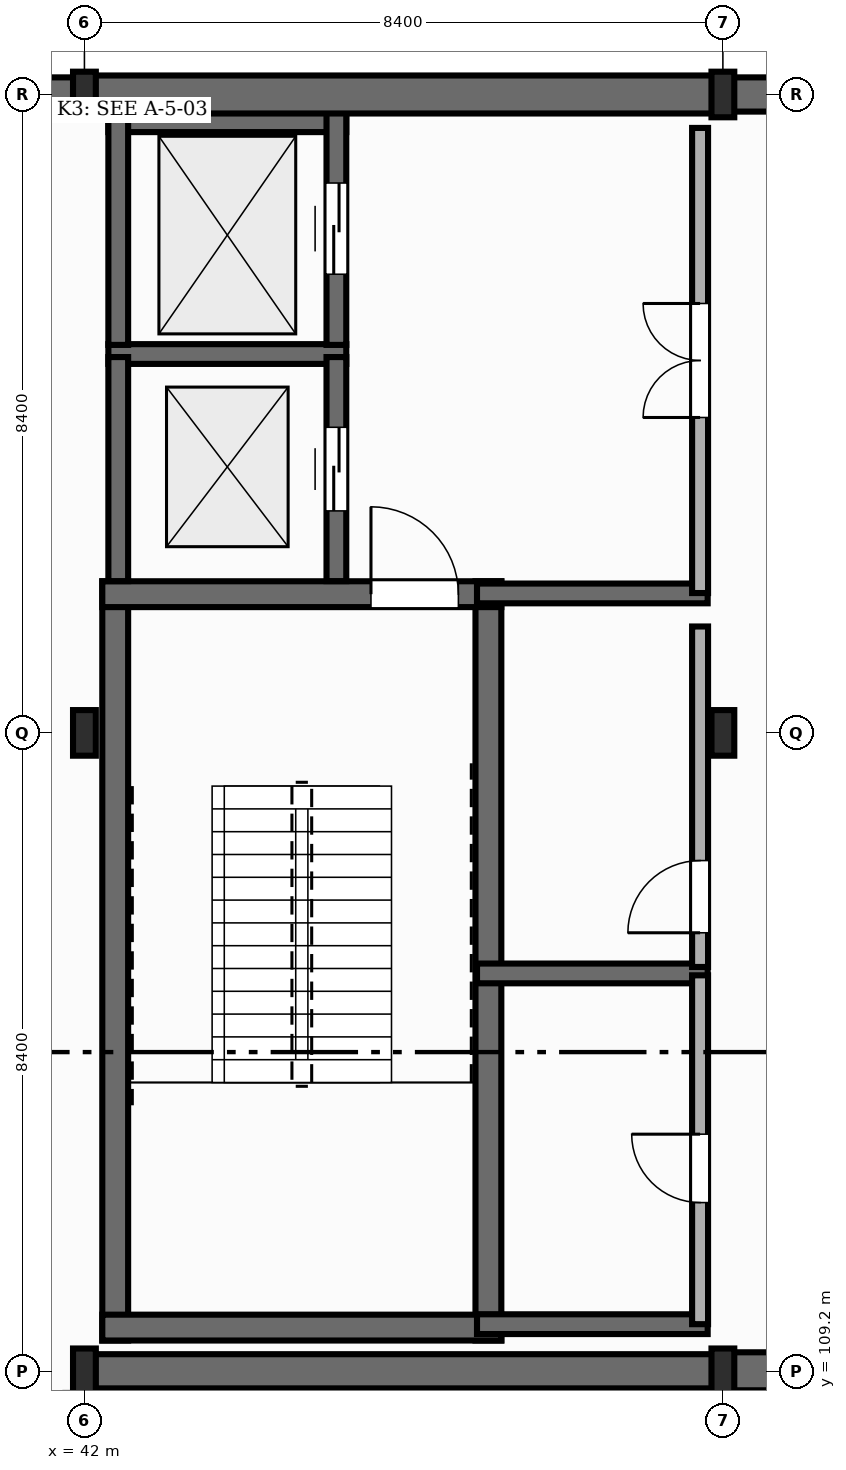
"""IFC4 building model, lengths in metres.
Left out: names, types, materials, properties, quantities, classifications, styles, units other than length and angle.
Written with IfcOpenShell. Run it as: python <this file> out.ifc"""

import sys

from ifc_helpers import new_model, si_unit, direction, frame, frame_2d, origin, origin_2d, place, context, subcontext, project, spatial, rectangle, i_section, extrude, element, fill, save


model = new_model("IFC4")
c1 = context("Model", 3, precision=1e-05, world=origin(), true_north=direction((0.0, 1.0)))
c2 = subcontext(c1, "Body", "Model", "MODEL_VIEW")
j1 = project(units=[si_unit("LENGTHUNIT", "METRE"), si_unit("PLANEANGLEUNIT", "RADIAN")], contexts=[c1])
p1 = place(None, origin())
s1 = spatial("IfcSite", under=j1, at=p1, CompositionType="ELEMENT")
p2 = place(p1, origin())
s2 = spatial("IfcBuilding", under=s1, at=p2, CompositionType="ELEMENT")
p3 = place(p2, frame((0.0, 0.0, -4.5)))
s3 = spatial("IfcBuildingStorey", under=s2, at=p3, CompositionType="ELEMENT", Elevation=-4.5)
for number, where, z_axis, x_axis in (
    (1, (42.0, 109.2, 0.0), (0.0, 0.0, 1.0), (1.0, 0.0, 0.0)),
    (2, (42.0, 117.6, 0.0), (0.0, 0.0, 1.0), (1.0, 0.0, 0.0)),
    (3, (42.0, 126.0, 0.0), (0.0, 0.0, 1.0), (1.0, 0.0, 0.0)),
    (4, (50.4, 109.2, 0.0), (0.0, 0.0, 1.0), (1.0, 0.0, 0.0)),
    (5, (50.4, 117.6, 0.0), (0.0, 0.0, 1.0), (1.0, 0.0, 0.0)),
    (6, (50.4, 126.0, 0.0), (0.0, 0.0, 1.0), (1.0, 0.0, 0.0)),
):
    element("IfcColumn", number, at=place(p3, frame(where, z_axis=z_axis, x_axis=x_axis)), inside=s3, PredefinedType="COLUMN", context=c2, shape_type="SweptSolid", body=[
        extrude(i_section(OverallWidth=0.3, OverallDepth=0.6, WebThickness=0.015, FlangeThickness=0.03, FilletRadius=0.027, at=origin_2d()), origin(), (0.0, 0.0, 1.0), 4.5),
    ])
for number, where, z_axis, x_axis in (
    (7, (58.792, 126.0, 0.0), (0.0, 0.0, 1.0), (-1.0, 0.0, 0.0)),
    (8, (41.992, 126.0, 0.0), (0.0, 0.0, 1.0), (-1.0, 0.0, 0.0)),
    (9, (42.008, 109.2, 0.0), (0.0, 0.0, 1.0), (1.0, 0.0, 0.0)),
):
    element("IfcWall", number, at=place(p3, frame(where, z_axis=z_axis, x_axis=x_axis)), inside=s3, PredefinedType="USERDEFINED", context=c2, shape_type="SweptSolid", body=[
        extrude(rectangle(XDim=8.384, YDim=0.45, at=frame_2d((4.192, 0.0))), origin(), (0.0, 0.0, 1.0), 4.25),
    ])
p4 = place(p3, frame((50.408, 109.2, 0.0), z_axis=(0.0, 0.0, 1.0), x_axis=(1.0, 0.0, 0.0)))
e10 = element("IfcWall", 10, at=p4, inside=s3, PredefinedType="USERDEFINED", context=c2, shape_type="SweptSolid", body=[
    extrude(rectangle(XDim=8.384, YDim=0.5, at=frame_2d((4.192, 0.0))), origin(), (0.0, 0.0, 1.0), 4.25),
])
for number, where, z_axis, x_axis in (
    (11, (42.405, 109.605, 0.0), (0.0, 0.0, 1.0), (0.0, 1.0, 0.0)),
    (12, (47.315, 109.605, 0.0), (0.0, 0.0, 1.0), (0.0, 1.0, 0.0)),
):
    element("IfcWall", number, at=place(p3, frame(where, z_axis=z_axis, x_axis=x_axis)), inside=s3, PredefinedType="SHEAR", context=c2, shape_type="SweptSolid", body=[
        extrude(rectangle(XDim=9.99, YDim=0.34, at=frame_2d((4.995, 0.0))), origin(), (0.0, 0.0, 1.0), 4.25),
    ])
p5 = place(p3, frame((42.235, 109.775, 0.0), z_axis=(0.0, 0.0, 1.0), x_axis=(1.0, 0.0, 0.0)))
e13 = element("IfcWall", 13, at=p5, inside=s3, PredefinedType="SHEAR", context=c2, shape_type="SweptSolid", body=[
    extrude(rectangle(XDim=5.25, YDim=0.34, at=frame_2d((2.625, 0.0))), origin(), (0.0, 0.0, 1.0), 4.25),
])
p6 = place(p3, frame((42.235, 119.425, 0.0), z_axis=(0.0, 0.0, 1.0), x_axis=(1.0, 0.0, 0.0)))
e14 = element("IfcWall", 14, at=p6, inside=s3, PredefinedType="SHEAR", context=c2, shape_type="SweptSolid", body=[
    extrude(rectangle(XDim=5.25, YDim=0.34, at=frame_2d((2.625, 0.0))), origin(), (0.0, 0.0, 1.0), 4.25),
])
p7 = place(p6, frame((3.535, 0.0, 0.0)))
e15 = element("IfcOpeningElement", 15, at=p7, cuts=e14, PredefinedType="OPENING", context=c2, shape_type="SweptSolid", body=[
    extrude(rectangle(XDim=1.15, YDim=2.15, at=frame_2d((0.575, 1.075))), frame((0.0, 0.18, 0.0), z_axis=(0.0, -1.0, 0.0), x_axis=(1.0, 0.0, 0.0)), (0.0, 0.0, 1.0), 0.36),
])
p8 = place(p3, frame((42.315, 122.585, 0.0), z_axis=(0.0, 0.0, 1.0), x_axis=(1.0, 0.0, 0.0)))
e16 = element("IfcWall", 16, at=p8, inside=s3, PredefinedType="SHEAR", context=c2, shape_type="SweptSolid", body=[
    extrude(rectangle(XDim=3.13, YDim=0.26, at=frame_2d((1.565, 0.0))), origin(), (0.0, 0.0, 1.0), 4.25),
])
p9 = place(p3, frame((42.445, 119.597, 0.0), z_axis=(0.0, 0.0, 1.0), x_axis=(0.0, 1.0, 0.0)))
e17 = element("IfcWall", 17, at=p9, inside=s3, PredefinedType="SHEAR", context=c2, shape_type="SweptSolid", body=[
    extrude(rectangle(XDim=2.948, YDim=0.26, at=frame_2d((1.474, 0.0))), origin(), (0.0, 0.0, 1.0), 4.25),
])
p10 = place(p3, frame((45.315, 119.597, 0.0), z_axis=(0.0, 0.0, 1.0), x_axis=(0.0, 1.0, 0.0)))
e18 = element("IfcWall", 18, at=p10, inside=s3, PredefinedType="SHEAR", context=c2, shape_type="SweptSolid", body=[
    extrude(rectangle(XDim=2.948, YDim=0.26, at=frame_2d((1.474, 0.0))), origin(), (0.0, 0.0, 1.0), 4.25),
])
p11 = place(p10, frame((0.924, 0.0, 0.0)))
e19 = element("IfcOpeningElement", 19, at=p11, cuts=e18, PredefinedType="OPENING", context=c2, shape_type="SweptSolid", body=[
    extrude(rectangle(XDim=1.1, YDim=2.15, at=frame_2d((0.55, 1.075))), frame((0.0, 0.14, 0.0), z_axis=(0.0, -1.0, 0.0), x_axis=(1.0, 0.0, 0.0)), (0.0, 0.0, 1.0), 0.28),
])
p12 = place(p3, frame((42.315, 125.635, 0.0), z_axis=(0.0, 0.0, 1.0), x_axis=(1.0, 0.0, 0.0)))
e20 = element("IfcWall", 20, at=p12, inside=s3, PredefinedType="SHEAR", context=c2, shape_type="SweptSolid", body=[
    extrude(rectangle(XDim=3.13, YDim=0.26, at=frame_2d((1.565, 0.0))), origin(), (0.0, 0.0, 1.0), 4.25),
])
p13 = place(p3, frame((42.445, 122.705, 0.0), z_axis=(0.0, 0.0, 1.0), x_axis=(0.0, 1.0, 0.0)))
e21 = element("IfcWall", 21, at=p13, inside=s3, PredefinedType="SHEAR", context=c2, shape_type="SweptSolid", body=[
    extrude(rectangle(XDim=3.06, YDim=0.26, at=frame_2d((1.53, 0.0))), origin(), (0.0, 0.0, 1.0), 4.25),
])
p14 = place(p3, frame((45.315, 122.705, 0.0), z_axis=(0.0, 0.0, 1.0), x_axis=(0.0, 1.0, 0.0)))
e22 = element("IfcWall", 22, at=p14, inside=s3, PredefinedType="SHEAR", context=c2, shape_type="SweptSolid", body=[
    extrude(rectangle(XDim=3.06, YDim=0.26, at=frame_2d((1.53, 0.0))), origin(), (0.0, 0.0, 1.0), 4.25),
])
p15 = place(p14, frame((0.93, 0.0, 0.0)))
e23 = element("IfcOpeningElement", 23, at=p15, cuts=e22, PredefinedType="OPENING", context=c2, shape_type="SweptSolid", body=[
    extrude(rectangle(XDim=1.2, YDim=2.15, at=frame_2d((0.6, 1.075))), frame((0.0, 0.14, 0.0), z_axis=(0.0, -1.0, 0.0), x_axis=(1.0, 0.0, 0.0)), (0.0, 0.0, 1.0), 0.28),
])
for number, where, z_axis, x_axis in (
    (24, (47.165, 109.82, 0.0), (0.0, 0.0, 1.0), (1.0, 0.0, 0.0)),
    (25, (47.165, 114.435, 0.0), (0.0, 0.0, 1.0), (1.0, 0.0, 0.0)),
    (26, (47.165, 119.435, 0.0), (0.0, 0.0, 1.0), (1.0, 0.0, 0.0)),
):
    element("IfcWall", number, at=place(p3, frame(where, z_axis=z_axis, x_axis=x_axis)), inside=s3, PredefinedType="SHEAR", context=c2, shape_type="SweptSolid", body=[
        extrude(rectangle(XDim=3.035, YDim=0.26, at=frame_2d((1.518, 0.0))), origin(), (0.0, 0.0, 1.0), 4.25),
    ])
p16 = place(p3, frame((50.1, 109.82, 0.0), z_axis=(0.0, 0.0, 1.0), x_axis=(0.0, 1.0, 0.0)))
e27 = element("IfcWall", 27, at=p16, inside=s3, PredefinedType="STANDARD", context=c2, shape_type="SweptSolid", body=[
    extrude(rectangle(XDim=4.59, YDim=0.21, at=frame_2d((2.295, 0.0))), origin(), (0.0, 0.0, 1.0), 3.632),
])
p17 = place(p16, frame((1.6, 0.0, 0.0)))
e28 = element("IfcOpeningElement", 28, at=p17, cuts=e27, PredefinedType="OPENING", context=c2, shape_type="SweptSolid", body=[
    extrude(rectangle(XDim=0.9, YDim=2.1, at=frame_2d((0.45, 1.05))), frame((0.0, 0.115, 0.0), z_axis=(0.0, -1.0, 0.0), x_axis=(1.0, 0.0, 0.0)), (0.0, 0.0, 1.0), 0.23),
])
p18 = place(p3, frame((50.1, 114.52, 0.0), z_axis=(0.0, 0.0, 1.0), x_axis=(0.0, 1.0, 0.0)))
e29 = element("IfcWall", 29, at=p18, inside=s3, PredefinedType="STANDARD", context=c2, shape_type="SweptSolid", body=[
    extrude(rectangle(XDim=4.48, YDim=0.21, at=frame_2d((2.24, 0.0))), origin(), (0.0, 0.0, 1.0), 3.632),
])
p19 = place(p18, frame((0.45, 0.0, 0.0)))
e30 = element("IfcOpeningElement", 30, at=p19, cuts=e29, PredefinedType="OPENING", context=c2, shape_type="SweptSolid", body=[
    extrude(rectangle(XDim=0.95, YDim=2.15, at=frame_2d((0.475, 1.075))), frame((0.0, 0.115, 0.0), z_axis=(0.0, -1.0, 0.0), x_axis=(1.0, 0.0, 0.0)), (0.0, 0.0, 1.0), 0.23),
])
p20 = place(p3, frame((50.1, 119.44, 0.0), z_axis=(0.0, 0.0, 1.0), x_axis=(0.0, 1.0, 0.0)))
e31 = element("IfcWall", 31, at=p20, inside=s3, PredefinedType="STANDARD", context=c2, shape_type="SweptSolid", body=[
    extrude(rectangle(XDim=6.12, YDim=0.21, at=frame_2d((3.06, 0.0))), origin(), (0.0, 0.0, 1.0), 3.742),
])
p21 = place(p20, frame((2.31, 0.0, 0.0)))
e32 = element("IfcOpeningElement", 32, at=p21, cuts=e31, PredefinedType="OPENING", context=c2, shape_type="SweptSolid", body=[
    extrude(rectangle(XDim=1.5, YDim=2.2, at=frame_2d((0.75, 1.1))), frame((0.0, 0.115, 0.0), z_axis=(0.0, -1.0, 0.0), x_axis=(1.0, 0.0, 0.0)), (0.0, 0.0, 1.0), 0.23),
])
p22 = place(p3, frame((50.392, 126.0, 0.0), z_axis=(0.0, 0.0, 1.0), x_axis=(-1.0, 0.0, 0.0)))
e33 = element("IfcWall", 33, at=p22, inside=s3, PredefinedType="USERDEFINED", context=c2, shape_type="SweptSolid", body=[
    extrude(rectangle(XDim=8.384, YDim=0.5, at=frame_2d((4.192, 0.0))), origin(), (0.0, 0.0, 1.0), 4.25),
])
p23 = place(p7, origin())
e34 = element("IfcDoor", 34, at=p23, inside=s3, OperationType="SINGLE_SWING_LEFT", PredefinedType="DOOR", context=c2, shape_type="SweptSolid", body=[
    extrude(rectangle(XDim=1.15, YDim=2.15, at=frame_2d((0.575, 1.075))), frame((0.0, 0.025, 0.0), z_axis=(0.0, -1.0, 0.0), x_axis=(1.0, 0.0, 0.0)), (0.0, 0.0, 1.0), 0.05),
])
fill(e15, e34)
p24 = place(p11, origin())
e35 = element("IfcDoor", 35, at=p24, inside=s3, OperationType="DOUBLE_DOOR_SLIDING", PredefinedType="DOOR", context=c2, shape_type="SweptSolid", body=[
    extrude(rectangle(XDim=1.1, YDim=2.15, at=frame_2d((0.55, 1.075))), frame((0.0, 0.025, 0.0), z_axis=(0.0, -1.0, 0.0), x_axis=(1.0, 0.0, 0.0)), (0.0, 0.0, 1.0), 0.05),
])
fill(e19, e35)
p25 = place(p15, origin())
e36 = element("IfcDoor", 36, at=p25, inside=s3, OperationType="DOUBLE_DOOR_SLIDING", PredefinedType="DOOR", context=c2, shape_type="SweptSolid", body=[
    extrude(rectangle(XDim=1.2, YDim=2.15, at=frame_2d((0.6, 1.075))), frame((0.0, 0.025, 0.0), z_axis=(0.0, -1.0, 0.0), x_axis=(1.0, 0.0, 0.0)), (0.0, 0.0, 1.0), 0.05),
])
fill(e23, e36)
p26 = place(p17, origin())
e37 = element("IfcDoor", 37, at=p26, inside=s3, OperationType="SINGLE_SWING_RIGHT", PredefinedType="DOOR", context=c2, shape_type="SweptSolid", body=[
    extrude(rectangle(XDim=0.9, YDim=2.1, at=frame_2d((0.45, 1.05))), frame((0.0, 0.025, 0.0), z_axis=(0.0, -1.0, 0.0), x_axis=(1.0, 0.0, 0.0)), (0.0, 0.0, 1.0), 0.05),
])
fill(e28, e37)
p27 = place(p19, origin())
e38 = element("IfcDoor", 38, at=p27, inside=s3, OperationType="SINGLE_SWING_LEFT", PredefinedType="DOOR", context=c2, shape_type="SweptSolid", body=[
    extrude(rectangle(XDim=0.95, YDim=2.15, at=frame_2d((0.475, 1.075))), frame((0.0, 0.025, 0.0), z_axis=(0.0, -1.0, 0.0), x_axis=(1.0, 0.0, 0.0)), (0.0, 0.0, 1.0), 0.05),
])
fill(e30, e38)
p28 = place(p21, origin())
e39 = element("IfcDoor", 39, at=p28, inside=s3, OperationType="DOUBLE_DOOR_SINGLE_SWING", PredefinedType="DOOR", context=c2, shape_type="SweptSolid", body=[
    extrude(rectangle(XDim=1.5, YDim=2.2, at=frame_2d((0.75, 1.1))), frame((0.0, 0.025, 0.0), z_axis=(0.0, -1.0, 0.0), x_axis=(1.0, 0.0, 0.0)), (0.0, 0.0, 1.0), 0.05),
])
fill(e32, e39)
save(model, sys.argv[1])
